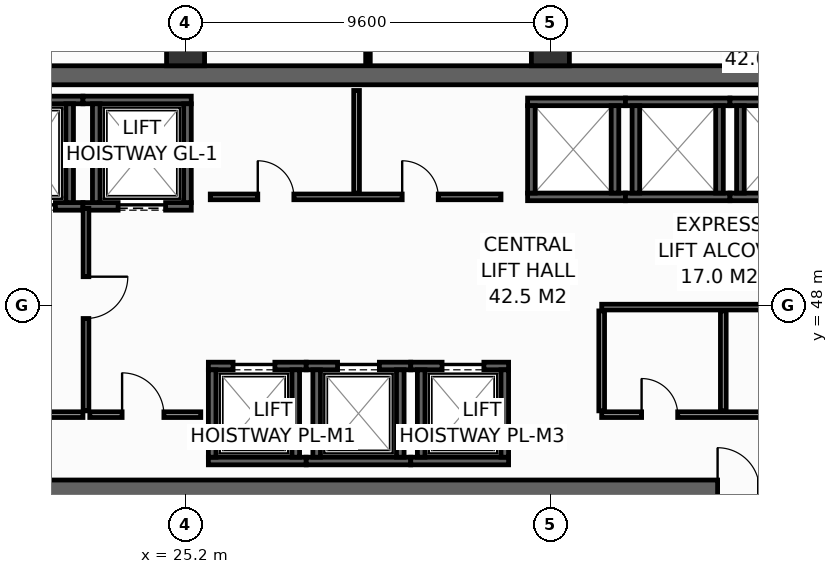
"""IFC4 building model, lengths in metres.
Left out: names, types, materials, properties, quantities, classifications, styles, units other than length and angle.
Written with IfcOpenShell. Run it as: python <this file> out.ifc"""

import sys

from ifc_helpers import new_model, si_unit, direction, frame, frame_2d, origin, origin_2d, place, context, subcontext, project, spatial, rectangle, hollow_rectangle, extrude, element, fill, save


model = new_model("IFC4")
c1 = context("Model", 3, precision=1e-05, world=origin(), true_north=direction((0.0, 1.0)))
c2 = subcontext(c1, "Body", "Model", "MODEL_VIEW")
j1 = project(units=[si_unit("LENGTHUNIT", "METRE"), si_unit("PLANEANGLEUNIT", "RADIAN")], contexts=[c1])
p1 = place(None, origin())
s1 = spatial("IfcSite", under=j1, at=p1, CompositionType="ELEMENT")
p2 = place(p1, origin())
s2 = spatial("IfcBuilding", under=s1, at=p2, CompositionType="ELEMENT")
p3 = place(p2, frame((0.0, 0.0, 167.6)))
s3 = spatial("IfcBuildingStorey", under=s2, at=p3, CompositionType="ELEMENT", Elevation=167.6)
p4 = place(p3, frame((13.6, 43.15, 0.0), z_axis=(0.0, 0.0, 1.0), x_axis=(1.0, 0.0, 0.0)))
e1 = element("IfcWall", 1, at=p4, inside=s3, PredefinedType="SHEAR", context=c2, shape_type="SweptSolid", body=[
    extrude(rectangle(XDim=32.7, YDim=0.5, at=frame_2d((16.35, 0.0))), origin(), (0.0, 0.0, 1.0), 3.55),
])
p5 = place(p4, frame((5.4, 0.0, 0.0)))
e2 = element("IfcOpeningElement", 2, at=p5, cuts=e1, PredefinedType="OPENING", context=c2, shape_type="SweptSolid", body=[
    extrude(rectangle(XDim=1.1, YDim=2.15, at=frame_2d((0.55, 1.075))), frame((0.0, 0.26, 0.0), z_axis=(0.0, -1.0, 0.0), x_axis=(1.0, 0.0, 0.0)), (0.0, 0.0, 1.0), 0.52),
])
p6 = place(p4, frame((25.6, 0.0, 0.0)))
e3 = element("IfcOpeningElement", 3, at=p6, cuts=e1, PredefinedType="OPENING", context=c2, shape_type="SweptSolid", body=[
    extrude(rectangle(XDim=1.1, YDim=2.15, at=frame_2d((0.55, 1.075))), frame((0.0, 0.26, 0.0), z_axis=(0.0, -1.0, 0.0), x_axis=(1.0, 0.0, 0.0)), (0.0, 0.0, 1.0), 0.52),
])
p7 = place(p3, frame((13.6, 54.05, 0.0), z_axis=(0.0, 0.0, 1.0), x_axis=(1.0, 0.0, 0.0)))
e4 = element("IfcWall", 4, at=p7, inside=s3, PredefinedType="SHEAR", context=c2, shape_type="SweptSolid", body=[
    extrude(rectangle(XDim=32.7, YDim=0.5, at=frame_2d((16.35, 0.0))), origin(), (0.0, 0.0, 1.0), 3.55),
])
for number, where, z_axis, x_axis in (
    (5, (25.2, 54.8, 0.0), (0.0, 0.0, 1.0), (1.0, 0.0, 0.0)),
    (6, (34.8, 54.8, 0.0), (0.0, 0.0, 1.0), (1.0, 0.0, 0.0)),
):
    element("IfcColumn", number, at=place(p3, frame(where, z_axis=z_axis, x_axis=x_axis)), inside=s3, PredefinedType="COLUMN", context=c2, shape_type="SweptSolid", body=[
        extrude(hollow_rectangle(XDim=1.0, YDim=1.0, WallThickness=0.045, at=origin_2d()), origin(), (0.0, 0.0, 1.0), 3.8),
    ])
p8 = place(p3, frame((19.85, 50.6, 0.0), z_axis=(0.0, 0.0, 1.0), x_axis=(1.0, 0.0, 0.0)))
e7 = element("IfcWall", 7, at=p8, inside=s3, PredefinedType="SHEAR", context=c2, shape_type="SweptSolid", body=[
    extrude(rectangle(XDim=2.65, YDim=0.2, at=frame_2d((1.325, 0.0))), origin(), (0.0, 0.0, 1.0), 3.55),
])
p9 = place(p8, frame((0.675, 0.0, 0.0)))
e8 = element("IfcOpeningElement", 8, at=p9, cuts=e7, PredefinedType="OPENING", context=c2, shape_type="SweptSolid", body=[
    extrude(rectangle(XDim=1.25, YDim=2.3, at=frame_2d((0.625, 1.15))), frame((0.0, 0.11, 0.0), z_axis=(0.0, -1.0, 0.0), x_axis=(1.0, 0.0, 0.0)), (0.0, 0.0, 1.0), 0.22),
])
p10 = place(p3, frame((19.85, 53.4, 0.0), z_axis=(0.0, 0.0, 1.0), x_axis=(1.0, 0.0, 0.0)))
e9 = element("IfcWall", 9, at=p10, inside=s3, PredefinedType="SHEAR", context=c2, shape_type="SweptSolid", body=[
    extrude(rectangle(XDim=2.65, YDim=0.2, at=frame_2d((1.325, 0.0))), origin(), (0.0, 0.0, 1.0), 3.55),
])
p11 = place(p3, frame((22.15, 50.7, 0.0), z_axis=(0.0, 0.0, 1.0), x_axis=(0.0, 1.0, 0.0)))
e10 = element("IfcWall", 10, at=p11, inside=s3, PredefinedType="SHEAR", context=c2, shape_type="SweptSolid", body=[
    extrude(rectangle(XDim=2.6, YDim=0.2, at=frame_2d((1.3, 0.0))), origin(), (0.0, 0.0, 1.0), 3.55),
])
p12 = place(p3, frame((22.5, 50.6, 0.0), z_axis=(0.0, 0.0, 1.0), x_axis=(1.0, 0.0, 0.0)))
e11 = element("IfcWall", 11, at=p12, inside=s3, PredefinedType="SHEAR", context=c2, shape_type="SweptSolid", body=[
    extrude(rectangle(XDim=2.85, YDim=0.2, at=frame_2d((1.425, 0.0))), origin(), (0.0, 0.0, 1.0), 3.55),
])
p13 = place(p12, frame((0.925, 0.0, 0.0)))
e12 = element("IfcOpeningElement", 12, at=p13, cuts=e11, PredefinedType="OPENING", context=c2, shape_type="SweptSolid", body=[
    extrude(rectangle(XDim=1.25, YDim=2.3, at=frame_2d((0.625, 1.15))), frame((0.0, 0.11, 0.0), z_axis=(0.0, -1.0, 0.0), x_axis=(1.0, 0.0, 0.0)), (0.0, 0.0, 1.0), 0.22),
])
p14 = place(p3, frame((22.5, 53.4, 0.0), z_axis=(0.0, 0.0, 1.0), x_axis=(1.0, 0.0, 0.0)))
e13 = element("IfcWall", 13, at=p14, inside=s3, PredefinedType="SHEAR", context=c2, shape_type="SweptSolid", body=[
    extrude(rectangle(XDim=2.85, YDim=0.2, at=frame_2d((1.425, 0.0))), origin(), (0.0, 0.0, 1.0), 3.55),
])
for number, where, z_axis, x_axis in (
    (14, (22.85, 50.7, 0.0), (0.0, 0.0, 1.0), (0.0, 1.0, 0.0)),
    (15, (25.25, 50.7, 0.0), (0.0, 0.0, 1.0), (0.0, 1.0, 0.0)),
):
    element("IfcWall", number, at=place(p3, frame(where, z_axis=z_axis, x_axis=x_axis)), inside=s3, PredefinedType="SHEAR", context=c2, shape_type="SweptSolid", body=[
        extrude(rectangle(XDim=2.6, YDim=0.2, at=frame_2d((1.3, 0.0))), origin(), (0.0, 0.0, 1.0), 3.55),
    ])
p15 = place(p3, frame((25.8, 43.9, 0.0), z_axis=(0.0, 0.0, 1.0), x_axis=(1.0, 0.0, 0.0)))
e16 = element("IfcWall", 16, at=p15, inside=s3, PredefinedType="SHEAR", context=c2, shape_type="SweptSolid", body=[
    extrude(rectangle(XDim=2.575, YDim=0.2, at=frame_2d((1.288, 0.0))), origin(), (0.0, 0.0, 1.0), 3.55),
])
p16 = place(p3, frame((25.8, 46.4, 0.0), z_axis=(0.0, 0.0, 1.0), x_axis=(1.0, 0.0, 0.0)))
e17 = element("IfcWall", 17, at=p16, inside=s3, PredefinedType="SHEAR", context=c2, shape_type="SweptSolid", body=[
    extrude(rectangle(XDim=2.575, YDim=0.2, at=frame_2d((1.288, 0.0))), origin(), (0.0, 0.0, 1.0), 3.55),
])
p17 = place(p16, frame((0.65, 0.0, 0.0)))
e18 = element("IfcOpeningElement", 18, at=p17, cuts=e17, PredefinedType="OPENING", context=c2, shape_type="SweptSolid", body=[
    extrude(rectangle(XDim=1.1, YDim=2.2, at=frame_2d((0.55, 1.1))), frame((0.0, 0.11, 0.0), z_axis=(0.0, -1.0, 0.0), x_axis=(1.0, 0.0, 0.0)), (0.0, 0.0, 1.0), 0.22),
])
for number, where, z_axis, x_axis in (
    (19, (25.9, 44.0, 0.0), (0.0, 0.0, 1.0), (0.0, 1.0, 0.0)),
    (20, (28.1, 44.0, 0.0), (0.0, 0.0, 1.0), (0.0, 1.0, 0.0)),
):
    element("IfcWall", number, at=place(p3, frame(where, z_axis=z_axis, x_axis=x_axis)), inside=s3, PredefinedType="SHEAR", context=c2, shape_type="SweptSolid", body=[
        extrude(rectangle(XDim=2.3, YDim=0.2, at=frame_2d((1.15, 0.0))), origin(), (0.0, 0.0, 1.0), 3.55),
    ])
p18 = place(p3, frame((28.375, 43.9, 0.0), z_axis=(0.0, 0.0, 1.0), x_axis=(1.0, 0.0, 0.0)))
e21 = element("IfcWall", 21, at=p18, inside=s3, PredefinedType="SHEAR", context=c2, shape_type="SweptSolid", body=[
    extrude(rectangle(XDim=2.75, YDim=0.2, at=frame_2d((1.375, 0.0))), origin(), (0.0, 0.0, 1.0), 3.55),
])
p19 = place(p3, frame((28.375, 46.4, 0.0), z_axis=(0.0, 0.0, 1.0), x_axis=(1.0, 0.0, 0.0)))
e22 = element("IfcWall", 22, at=p19, inside=s3, PredefinedType="SHEAR", context=c2, shape_type="SweptSolid", body=[
    extrude(rectangle(XDim=2.75, YDim=0.2, at=frame_2d((1.375, 0.0))), origin(), (0.0, 0.0, 1.0), 3.55),
])
p20 = place(p19, frame((0.825, 0.0, 0.0)))
e23 = element("IfcOpeningElement", 23, at=p20, cuts=e22, PredefinedType="OPENING", context=c2, shape_type="SweptSolid", body=[
    extrude(rectangle(XDim=1.1, YDim=2.2, at=frame_2d((0.55, 1.1))), frame((0.0, 0.11, 0.0), z_axis=(0.0, -1.0, 0.0), x_axis=(1.0, 0.0, 0.0)), (0.0, 0.0, 1.0), 0.22),
])
for number, where, z_axis, x_axis in (
    (24, (28.65, 44.0, 0.0), (0.0, 0.0, 1.0), (0.0, 1.0, 0.0)),
    (25, (30.85, 44.0, 0.0), (0.0, 0.0, 1.0), (0.0, 1.0, 0.0)),
):
    element("IfcWall", number, at=place(p3, frame(where, z_axis=z_axis, x_axis=x_axis)), inside=s3, PredefinedType="SHEAR", context=c2, shape_type="SweptSolid", body=[
        extrude(rectangle(XDim=2.3, YDim=0.2, at=frame_2d((1.15, 0.0))), origin(), (0.0, 0.0, 1.0), 3.55),
    ])
p21 = place(p3, frame((31.125, 43.9, 0.0), z_axis=(0.0, 0.0, 1.0), x_axis=(1.0, 0.0, 0.0)))
e26 = element("IfcWall", 26, at=p21, inside=s3, PredefinedType="SHEAR", context=c2, shape_type="SweptSolid", body=[
    extrude(rectangle(XDim=2.575, YDim=0.2, at=frame_2d((1.288, 0.0))), origin(), (0.0, 0.0, 1.0), 3.55),
])
p22 = place(p3, frame((31.125, 46.4, 0.0), z_axis=(0.0, 0.0, 1.0), x_axis=(1.0, 0.0, 0.0)))
e27 = element("IfcWall", 27, at=p22, inside=s3, PredefinedType="SHEAR", context=c2, shape_type="SweptSolid", body=[
    extrude(rectangle(XDim=2.575, YDim=0.2, at=frame_2d((1.288, 0.0))), origin(), (0.0, 0.0, 1.0), 3.55),
])
p23 = place(p22, frame((0.825, 0.0, 0.0)))
e28 = element("IfcOpeningElement", 28, at=p23, cuts=e27, PredefinedType="OPENING", context=c2, shape_type="SweptSolid", body=[
    extrude(rectangle(XDim=1.1, YDim=2.2, at=frame_2d((0.55, 1.1))), frame((0.0, 0.11, 0.0), z_axis=(0.0, -1.0, 0.0), x_axis=(1.0, 0.0, 0.0)), (0.0, 0.0, 1.0), 0.22),
])
for number, where, z_axis, x_axis in (
    (29, (31.4, 44.0, 0.0), (0.0, 0.0, 1.0), (0.0, 1.0, 0.0)),
    (30, (33.6, 44.0, 0.0), (0.0, 0.0, 1.0), (0.0, 1.0, 0.0)),
):
    element("IfcWall", number, at=place(p3, frame(where, z_axis=z_axis, x_axis=x_axis)), inside=s3, PredefinedType="SHEAR", context=c2, shape_type="SweptSolid", body=[
        extrude(rectangle(XDim=2.3, YDim=0.2, at=frame_2d((1.15, 0.0))), origin(), (0.0, 0.0, 1.0), 3.55),
    ])
for number, where, z_axis, x_axis in (
    (31, (34.2, 50.85, 0.0), (0.0, 0.0, 1.0), (1.0, 0.0, 0.0)),
    (32, (34.2, 53.35, 0.0), (0.0, 0.0, 1.0), (1.0, 0.0, 0.0)),
):
    element("IfcWall", number, at=place(p3, frame(where, z_axis=z_axis, x_axis=x_axis)), inside=s3, PredefinedType="SHEAR", context=c2, shape_type="SweptSolid", body=[
        extrude(rectangle(XDim=2.575, YDim=0.2, at=frame_2d((1.288, 0.0))), origin(), (0.0, 0.0, 1.0), 3.55),
    ])
for number, where, z_axis, x_axis in (
    (33, (34.3, 50.95, 0.0), (0.0, 0.0, 1.0), (0.0, 1.0, 0.0)),
    (34, (36.5, 50.95, 0.0), (0.0, 0.0, 1.0), (0.0, 1.0, 0.0)),
):
    element("IfcWall", number, at=place(p3, frame(where, z_axis=z_axis, x_axis=x_axis)), inside=s3, PredefinedType="SHEAR", context=c2, shape_type="SweptSolid", body=[
        extrude(rectangle(XDim=2.3, YDim=0.2, at=frame_2d((1.15, 0.0))), origin(), (0.0, 0.0, 1.0), 3.55),
    ])
for number, where, z_axis, x_axis in (
    (35, (36.775, 50.85, 0.0), (0.0, 0.0, 1.0), (1.0, 0.0, 0.0)),
    (36, (36.775, 53.35, 0.0), (0.0, 0.0, 1.0), (1.0, 0.0, 0.0)),
):
    element("IfcWall", number, at=place(p3, frame(where, z_axis=z_axis, x_axis=x_axis)), inside=s3, PredefinedType="SHEAR", context=c2, shape_type="SweptSolid", body=[
        extrude(rectangle(XDim=2.75, YDim=0.2, at=frame_2d((1.375, 0.0))), origin(), (0.0, 0.0, 1.0), 3.55),
    ])
for number, where, z_axis, x_axis in (
    (37, (37.05, 50.95, 0.0), (0.0, 0.0, 1.0), (0.0, 1.0, 0.0)),
    (38, (39.25, 50.95, 0.0), (0.0, 0.0, 1.0), (0.0, 1.0, 0.0)),
):
    element("IfcWall", number, at=place(p3, frame(where, z_axis=z_axis, x_axis=x_axis)), inside=s3, PredefinedType="SHEAR", context=c2, shape_type="SweptSolid", body=[
        extrude(rectangle(XDim=2.3, YDim=0.2, at=frame_2d((1.15, 0.0))), origin(), (0.0, 0.0, 1.0), 3.55),
    ])
for number, where, z_axis, x_axis in (
    (39, (39.525, 50.85, 0.0), (0.0, 0.0, 1.0), (1.0, 0.0, 0.0)),
    (40, (39.525, 53.35, 0.0), (0.0, 0.0, 1.0), (1.0, 0.0, 0.0)),
):
    element("IfcWall", number, at=place(p3, frame(where, z_axis=z_axis, x_axis=x_axis)), inside=s3, PredefinedType="SHEAR", context=c2, shape_type="SweptSolid", body=[
        extrude(rectangle(XDim=3.045, YDim=0.2, at=frame_2d((1.522, 0.0))), origin(), (0.0, 0.0, 1.0), 3.55),
    ])
p24 = place(p3, frame((39.8, 50.95, 0.0), z_axis=(0.0, 0.0, 1.0), x_axis=(0.0, 1.0, 0.0)))
e41 = element("IfcWall", 41, at=p24, inside=s3, PredefinedType="SHEAR", context=c2, shape_type="SweptSolid", body=[
    extrude(rectangle(XDim=2.3, YDim=0.2, at=frame_2d((1.15, 0.0))), origin(), (0.0, 0.0, 1.0), 3.55),
])
p25 = place(p3, frame((17.36, 45.12, 0.0), z_axis=(0.0, 0.0, 1.0), x_axis=(1.0, 0.0, 0.0)))
e42 = element("IfcWall", 42, at=p25, inside=s3, PredefinedType="PARTITIONING", context=c2, shape_type="SweptSolid", body=[
    extrude(rectangle(XDim=5.14, YDim=0.15, at=frame_2d((2.57, 0.0))), origin(), (0.0, 0.0, 1.0), 3.55),
])
p26 = place(p25, frame((1.8, 0.0, 0.0)))
e43 = element("IfcOpeningElement", 43, at=p26, cuts=e42, PredefinedType="OPENING", context=c2, shape_type="SweptSolid", body=[
    extrude(rectangle(XDim=1.1, YDim=2.15, at=frame_2d((0.55, 1.075))), frame((0.0, 0.085, 0.0), z_axis=(0.0, -1.0, 0.0), x_axis=(1.0, 0.0, 0.0)), (0.0, 0.0, 1.0), 0.17),
])
p27 = place(p3, frame((22.58, 50.55, 0.0), z_axis=(0.0, 0.0, 1.0), x_axis=(0.0, -1.0, 0.0)))
e44 = element("IfcWall", 44, at=p27, inside=s3, PredefinedType="PARTITIONING", context=c2, shape_type="SweptSolid", body=[
    extrude(rectangle(XDim=5.33, YDim=0.15, at=frame_2d((2.665, 0.0))), origin(), (0.0, 0.0, 1.0), 3.55),
])
p28 = place(p27, frame((1.8, 0.0, 0.0)))
e45 = element("IfcOpeningElement", 45, at=p28, cuts=e44, PredefinedType="OPENING", context=c2, shape_type="SweptSolid", body=[
    extrude(rectangle(XDim=1.1, YDim=2.15, at=frame_2d((0.55, 1.075))), frame((0.0, 0.085, 0.0), z_axis=(0.0, -1.0, 0.0), x_axis=(1.0, 0.0, 0.0)), (0.0, 0.0, 1.0), 0.17),
])
p29 = place(p3, frame((22.68, 45.12, 0.0), z_axis=(0.0, 0.0, 1.0), x_axis=(1.0, 0.0, 0.0)))
e46 = element("IfcWall", 46, at=p29, inside=s3, PredefinedType="PARTITIONING", context=c2, shape_type="SweptSolid", body=[
    extrude(rectangle(XDim=2.92, YDim=0.15, at=frame_2d((1.46, 0.0))), origin(), (0.0, 0.0, 1.0), 3.55),
])
p30 = place(p29, frame((0.85, 0.0, 0.0)))
e47 = element("IfcOpeningElement", 47, at=p30, cuts=e46, PredefinedType="OPENING", context=c2, shape_type="SweptSolid", body=[
    extrude(rectangle(XDim=1.1, YDim=2.15, at=frame_2d((0.55, 1.075))), frame((0.0, 0.085, 0.0), z_axis=(0.0, -1.0, 0.0), x_axis=(1.0, 0.0, 0.0)), (0.0, 0.0, 1.0), 0.17),
])
p31 = place(p3, frame((36.15, 45.12, 0.0), z_axis=(0.0, 0.0, 1.0), x_axis=(1.0, 0.0, 0.0)))
e48 = element("IfcWall", 48, at=p31, inside=s3, PredefinedType="PARTITIONING", context=c2, shape_type="SweptSolid", body=[
    extrude(rectangle(XDim=6.35, YDim=0.15, at=frame_2d((3.175, 0.0))), origin(), (0.0, 0.0, 1.0), 3.55),
])
p32 = place(p31, frame((1.05, 0.0, 0.0)))
e49 = element("IfcOpeningElement", 49, at=p32, cuts=e48, PredefinedType="OPENING", context=c2, shape_type="SweptSolid", body=[
    extrude(rectangle(XDim=0.95, YDim=2.15, at=frame_2d((0.475, 1.075))), frame((0.0, 0.085, 0.0), z_axis=(0.0, -1.0, 0.0), x_axis=(1.0, 0.0, 0.0)), (0.0, 0.0, 1.0), 0.17),
])
p33 = place(p31, frame((4.25, 0.0, 0.0)))
e50 = element("IfcOpeningElement", 50, at=p33, cuts=e48, PredefinedType="OPENING", context=c2, shape_type="SweptSolid", body=[
    extrude(rectangle(XDim=0.95, YDim=2.15, at=frame_2d((0.475, 1.075))), frame((0.0, 0.085, 0.0), z_axis=(0.0, -1.0, 0.0), x_axis=(1.0, 0.0, 0.0)), (0.0, 0.0, 1.0), 0.17),
])
p34 = place(p3, frame((36.15, 47.95, 0.0), z_axis=(0.0, 0.0, 1.0), x_axis=(1.0, 0.0, 0.0)))
e51 = element("IfcWall", 51, at=p34, inside=s3, PredefinedType="PARTITIONING", context=c2, shape_type="SweptSolid", body=[
    extrude(rectangle(XDim=6.35, YDim=0.15, at=frame_2d((3.175, 0.0))), origin(), (0.0, 0.0, 1.0), 3.55),
])
for number, where, z_axis, x_axis in (
    (52, (36.15, 45.22, 0.0), (0.0, 0.0, 1.0), (0.0, 1.0, 0.0)),
    (53, (39.35, 45.22, 0.0), (0.0, 0.0, 1.0), (0.0, 1.0, 0.0)),
):
    element("IfcWall", number, at=place(p3, frame(where, z_axis=z_axis, x_axis=x_axis)), inside=s3, PredefinedType="PARTITIONING", context=c2, shape_type="SweptSolid", body=[
        extrude(rectangle(XDim=2.63, YDim=0.15, at=frame_2d((1.315, 0.0))), origin(), (0.0, 0.0, 1.0), 3.55),
    ])
p35 = place(p3, frame((25.85, 50.85, 0.0), z_axis=(0.0, 0.0, 1.0), x_axis=(1.0, 0.0, 0.0)))
e54 = element("IfcWall", 54, at=p35, inside=s3, PredefinedType="PARTITIONING", context=c2, shape_type="SweptSolid", body=[
    extrude(rectangle(XDim=7.65, YDim=0.15, at=frame_2d((3.825, 0.0))), origin(), (0.0, 0.0, 1.0), 3.55),
])
p36 = place(p35, frame((1.25, 0.0, 0.0)))
e55 = element("IfcOpeningElement", 55, at=p36, cuts=e54, PredefinedType="OPENING", context=c2, shape_type="SweptSolid", body=[
    extrude(rectangle(XDim=0.95, YDim=2.15, at=frame_2d((0.475, 1.075))), frame((0.0, 0.085, 0.0), z_axis=(0.0, -1.0, 0.0), x_axis=(1.0, 0.0, 0.0)), (0.0, 0.0, 1.0), 0.17),
])
p37 = place(p35, frame((5.05, 0.0, 0.0)))
e56 = element("IfcOpeningElement", 56, at=p37, cuts=e54, PredefinedType="OPENING", context=c2, shape_type="SweptSolid", body=[
    extrude(rectangle(XDim=0.95, YDim=2.15, at=frame_2d((0.475, 1.075))), frame((0.0, 0.085, 0.0), z_axis=(0.0, -1.0, 0.0), x_axis=(1.0, 0.0, 0.0)), (0.0, 0.0, 1.0), 0.17),
])
p38 = place(p3, frame((29.7, 50.95, 0.0), z_axis=(0.0, 0.0, 1.0), x_axis=(0.0, 1.0, 0.0)))
e57 = element("IfcWall", 57, at=p38, inside=s3, PredefinedType="PARTITIONING", context=c2, shape_type="SweptSolid", body=[
    extrude(rectangle(XDim=2.7, YDim=0.15, at=frame_2d((1.35, 0.0))), origin(), (0.0, 0.0, 1.0), 3.55),
])
p39 = place(p3, frame((30.0, 54.32, 0.0), z_axis=(0.0, 0.0, 1.0), x_axis=(0.0, 1.0, 0.0)))
e58 = element("IfcWall", 58, at=p39, inside=s3, PredefinedType="PARTITIONING", context=c2, shape_type="SweptSolid", body=[
    extrude(rectangle(XDim=1.675, YDim=0.12, at=frame_2d((0.837, 0.0))), origin(), (0.0, 0.0, 1.0), 2.935),
])
p40 = place(p9, origin())
e59 = element("IfcDoor", 59, at=p40, inside=s3, OperationType="SLIDING_TO_LEFT", PredefinedType="DOOR", context=c2, shape_type="SweptSolid", body=[
    extrude(rectangle(XDim=1.25, YDim=2.3, at=frame_2d((0.625, 1.15))), frame((0.0, 0.025, 0.0), z_axis=(0.0, -1.0, 0.0), x_axis=(1.0, 0.0, 0.0)), (0.0, 0.0, 1.0), 0.05),
])
fill(e8, e59)
p41 = place(p13, origin())
e60 = element("IfcDoor", 60, at=p41, inside=s3, OperationType="SLIDING_TO_LEFT", PredefinedType="DOOR", context=c2, shape_type="SweptSolid", body=[
    extrude(rectangle(XDim=1.25, YDim=2.3, at=frame_2d((0.625, 1.15))), frame((0.0, 0.025, 0.0), z_axis=(0.0, -1.0, 0.0), x_axis=(1.0, 0.0, 0.0)), (0.0, 0.0, 1.0), 0.05),
])
fill(e12, e60)
p42 = place(p17, origin())
e61 = element("IfcDoor", 61, at=p42, inside=s3, OperationType="SLIDING_TO_LEFT", PredefinedType="DOOR", context=c2, shape_type="SweptSolid", body=[
    extrude(rectangle(XDim=1.1, YDim=2.2, at=frame_2d((0.55, 1.1))), frame((0.0, 0.025, 0.0), z_axis=(0.0, -1.0, 0.0), x_axis=(1.0, 0.0, 0.0)), (0.0, 0.0, 1.0), 0.05),
])
fill(e18, e61)
p43 = place(p20, origin())
e62 = element("IfcDoor", 62, at=p43, inside=s3, OperationType="SLIDING_TO_LEFT", PredefinedType="DOOR", context=c2, shape_type="SweptSolid", body=[
    extrude(rectangle(XDim=1.1, YDim=2.2, at=frame_2d((0.55, 1.1))), frame((0.0, 0.025, 0.0), z_axis=(0.0, -1.0, 0.0), x_axis=(1.0, 0.0, 0.0)), (0.0, 0.0, 1.0), 0.05),
])
fill(e23, e62)
p44 = place(p23, origin())
e63 = element("IfcDoor", 63, at=p44, inside=s3, OperationType="SLIDING_TO_LEFT", PredefinedType="DOOR", context=c2, shape_type="SweptSolid", body=[
    extrude(rectangle(XDim=1.1, YDim=2.2, at=frame_2d((0.55, 1.1))), frame((0.0, 0.025, 0.0), z_axis=(0.0, -1.0, 0.0), x_axis=(1.0, 0.0, 0.0)), (0.0, 0.0, 1.0), 0.05),
])
fill(e28, e63)
p45 = place(p28, origin())
e64 = element("IfcDoor", 64, at=p45, inside=s3, OperationType="SINGLE_SWING_LEFT", PredefinedType="DOOR", context=c2, shape_type="SweptSolid", body=[
    extrude(rectangle(XDim=1.1, YDim=2.15, at=frame_2d((0.55, 1.075))), frame((0.0, 0.025, 0.0), z_axis=(0.0, -1.0, 0.0), x_axis=(1.0, 0.0, 0.0)), (0.0, 0.0, 1.0), 0.05),
])
fill(e45, e64)
p46 = place(p30, origin())
e65 = element("IfcDoor", 65, at=p46, inside=s3, OperationType="SINGLE_SWING_LEFT", PredefinedType="DOOR", context=c2, shape_type="SweptSolid", body=[
    extrude(rectangle(XDim=1.1, YDim=2.15, at=frame_2d((0.55, 1.075))), frame((0.0, 0.025, 0.0), z_axis=(0.0, -1.0, 0.0), x_axis=(1.0, 0.0, 0.0)), (0.0, 0.0, 1.0), 0.05),
])
fill(e47, e65)
p47 = place(p6, origin())
e66 = element("IfcDoor", 66, at=p47, inside=s3, OperationType="SINGLE_SWING_LEFT", PredefinedType="DOOR", context=c2, shape_type="SweptSolid", body=[
    extrude(rectangle(XDim=1.1, YDim=2.15, at=frame_2d((0.55, 1.075))), frame((0.0, 0.025, 0.0), z_axis=(0.0, -1.0, 0.0), x_axis=(1.0, 0.0, 0.0)), (0.0, 0.0, 1.0), 0.05),
])
fill(e3, e66)
p48 = place(p32, origin())
e67 = element("IfcDoor", 67, at=p48, inside=s3, OperationType="SINGLE_SWING_LEFT", PredefinedType="DOOR", context=c2, shape_type="SweptSolid", body=[
    extrude(rectangle(XDim=0.95, YDim=2.15, at=frame_2d((0.475, 1.075))), frame((0.0, 0.025, 0.0), z_axis=(0.0, -1.0, 0.0), x_axis=(1.0, 0.0, 0.0)), (0.0, 0.0, 1.0), 0.05),
])
fill(e49, e67)
p49 = place(p36, origin())
e68 = element("IfcDoor", 68, at=p49, inside=s3, OperationType="SINGLE_SWING_LEFT", PredefinedType="DOOR", context=c2, shape_type="SweptSolid", body=[
    extrude(rectangle(XDim=0.95, YDim=2.15, at=frame_2d((0.475, 1.075))), frame((0.0, 0.025, 0.0), z_axis=(0.0, -1.0, 0.0), x_axis=(1.0, 0.0, 0.0)), (0.0, 0.0, 1.0), 0.05),
])
fill(e55, e68)
p50 = place(p37, origin())
e69 = element("IfcDoor", 69, at=p50, inside=s3, OperationType="SINGLE_SWING_LEFT", PredefinedType="DOOR", context=c2, shape_type="SweptSolid", body=[
    extrude(rectangle(XDim=0.95, YDim=2.15, at=frame_2d((0.475, 1.075))), frame((0.0, 0.025, 0.0), z_axis=(0.0, -1.0, 0.0), x_axis=(1.0, 0.0, 0.0)), (0.0, 0.0, 1.0), 0.05),
])
fill(e56, e69)
save(model, sys.argv[1])
